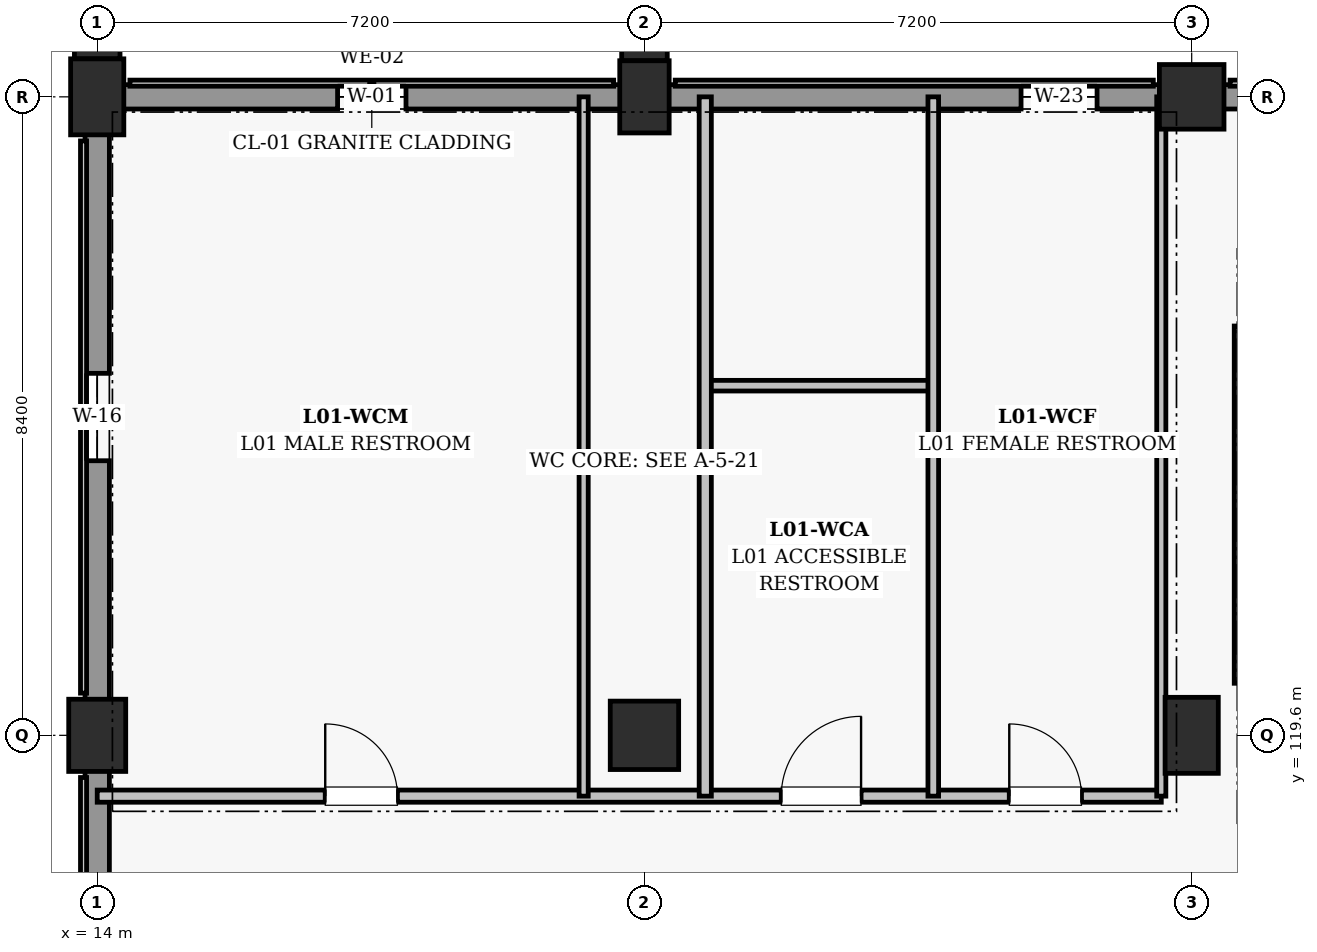
"""IFC4 building model, lengths in metres.
Left out: names, types, materials, properties, quantities, classifications, styles, units other than length and angle.
Written with IfcOpenShell. Run it as: python <this file> out.ifc"""

import sys

from ifc_helpers import new_model, si_unit, direction, frame, frame_2d, origin, origin_2d, place, context, subcontext, project, spatial, rectangle, extrude, element, fill, save


model = new_model("IFC4")
c1 = context("Model", 3, precision=1e-05, world=origin(), true_north=direction((0.0, 1.0)))
c2 = subcontext(c1, "Body", "Model", "MODEL_VIEW")
j1 = project(units=[si_unit("LENGTHUNIT", "METRE"), si_unit("PLANEANGLEUNIT", "RADIAN")], contexts=[c1])
p1 = place(None, origin())
s1 = spatial("IfcSite", under=j1, at=p1, CompositionType="ELEMENT")
p2 = place(p1, origin())
s2 = spatial("IfcBuilding", under=s1, at=p2, CompositionType="ELEMENT")
p3 = place(p2, frame((0.0, 0.0, 5.4)))
s3 = spatial("IfcBuildingStorey", under=s2, at=p3, CompositionType="ELEMENT", Elevation=5.4)
p4 = place(p3, frame((14.0, 119.6, 0.0), z_axis=(0.0, 0.0, 1.0), x_axis=(1.0, 0.0, 0.0)))
e1 = element("IfcColumn", 1, at=p4, inside=s3, PredefinedType="COLUMN", context=c2, shape_type="SweptSolid", body=[
    extrude(rectangle(XDim=0.75, YDim=0.95, at=origin_2d()), origin(), (0.0, 0.0, 1.0), 4.5),
])
p5 = place(p3, frame((14.0, 128.0, 0.0), z_axis=(0.0, 0.0, 1.0), x_axis=(1.0, 0.0, 0.0)))
e2 = element("IfcColumn", 2, at=p5, inside=s3, PredefinedType="COLUMN", context=c2, shape_type="SweptSolid", body=[
    extrude(rectangle(XDim=0.7, YDim=1.0, at=origin_2d()), origin(), (0.0, 0.0, 1.0), 4.5),
])
p6 = place(p3, frame((21.2, 119.6, 0.0), z_axis=(0.0, 0.0, 1.0), x_axis=(1.0, 0.0, 0.0)))
e3 = element("IfcColumn", 3, at=p6, inside=s3, PredefinedType="COLUMN", context=c2, shape_type="SweptSolid", body=[
    extrude(rectangle(XDim=0.9, YDim=0.9, at=origin_2d()), origin(), (0.0, 0.0, 1.0), 4.5),
])
p7 = place(p3, frame((21.2, 128.0, 0.0), z_axis=(0.0, 0.0, 1.0), x_axis=(1.0, 0.0, 0.0)))
e4 = element("IfcColumn", 4, at=p7, inside=s3, PredefinedType="COLUMN", context=c2, shape_type="SweptSolid", body=[
    extrude(rectangle(XDim=0.65, YDim=0.95, at=origin_2d()), origin(), (0.0, 0.0, 1.0), 4.5),
])
p8 = place(p3, frame((28.4, 119.6, 0.0), z_axis=(0.0, 0.0, 1.0), x_axis=(1.0, 0.0, 0.0)))
e5 = element("IfcColumn", 5, at=p8, inside=s3, PredefinedType="COLUMN", context=c2, shape_type="SweptSolid", body=[
    extrude(rectangle(XDim=0.7, YDim=1.0, at=origin_2d()), origin(), (0.0, 0.0, 1.0), 4.5),
])
p9 = place(p3, frame((28.4, 128.0, 0.0), z_axis=(0.0, 0.0, 1.0), x_axis=(1.0, 0.0, 0.0)))
e6 = element("IfcColumn", 6, at=p9, inside=s3, PredefinedType="COLUMN", context=c2, shape_type="SweptSolid", body=[
    extrude(rectangle(XDim=0.85, YDim=0.85, at=origin_2d()), origin(), (0.0, 0.0, 1.0), 4.5),
])
for number, where, z_axis, x_axis in (
    (7, (14.0, 128.928, 0.0), (0.0, 0.0, 1.0), (1.0, 0.0, 0.0)),
    (8, (21.2, 128.903, 0.0), (0.0, 0.0, 1.0), (1.0, 0.0, 0.0)),
):
    element("IfcColumn", number, at=place(p3, frame(where, z_axis=z_axis, x_axis=x_axis)), inside=s3, PredefinedType="PILASTER", context=c2, shape_type="SweptSolid", body=[
        extrude(rectangle(XDim=0.6, YDim=0.85, at=origin_2d()), origin(), (0.0, 0.0, 1.0), 4.5),
    ])
p10 = place(p3, frame((14.33, 128.0, 0.0), z_axis=(0.0, 0.0, 1.0), x_axis=(1.0, 0.0, 0.0)))
e9 = element("IfcWall", 9, at=p10, inside=s3, PredefinedType="SOLIDWALL", context=c2, shape_type="SweptSolid", body=[
    extrude(rectangle(XDim=6.565, YDim=0.32, at=frame_2d((3.282, 0.0))), origin(), (0.0, 0.0, 1.0), 3.505),
])
p11 = place(p10, frame((2.833, 0.0, 0.95)))
e10 = element("IfcOpeningElement", 10, at=p11, cuts=e9, PredefinedType="OPENING", context=c2, shape_type="SweptSolid", body=[
    extrude(rectangle(XDim=0.9, YDim=2.2, at=frame_2d((0.45, 1.1))), frame((0.0, 0.17, 0.0), z_axis=(0.0, -1.0, 0.0), x_axis=(1.0, 0.0, 0.0)), (0.0, 0.0, 1.0), 0.34),
])
p12 = place(p3, frame((21.505, 128.0, 0.0), z_axis=(0.0, 0.0, 1.0), x_axis=(1.0, 0.0, 0.0)))
e11 = element("IfcWall", 11, at=p12, inside=s3, PredefinedType="SOLIDWALL", context=c2, shape_type="SweptSolid", body=[
    extrude(rectangle(XDim=6.49, YDim=0.32, at=frame_2d((3.245, 0.0))), origin(), (0.0, 0.0, 1.0), 3.455),
])
p13 = place(p12, frame((4.65, 0.0, 1.85)))
e12 = element("IfcOpeningElement", 12, at=p13, cuts=e11, PredefinedType="OPENING", context=c2, shape_type="SweptSolid", body=[
    extrude(rectangle(XDim=1.0, YDim=0.95, at=frame_2d((0.5, 0.475))), frame((0.0, 0.17, 0.0), z_axis=(0.0, -1.0, 0.0), x_axis=(1.0, 0.0, 0.0)), (0.0, 0.0, 1.0), 0.34),
])
p14 = place(p3, frame((28.805, 128.0, 0.0), z_axis=(0.0, 0.0, 1.0), x_axis=(1.0, 0.0, 0.0)))
e13 = element("IfcWall", 13, at=p14, inside=s3, PredefinedType="SOLIDWALL", context=c2, shape_type="SweptSolid", body=[
    extrude(rectangle(XDim=6.44, YDim=0.32, at=frame_2d((3.22, 0.0))), origin(), (0.0, 0.0, 1.0), 3.555),
])
p15 = place(p3, frame((14.0, 111.63, 0.0), z_axis=(0.0, 0.0, 1.0), x_axis=(0.0, 1.0, 0.0)))
e14 = element("IfcWall", 14, at=p15, inside=s3, PredefinedType="SOLIDWALL", context=c2, shape_type="SweptSolid", body=[
    extrude(rectangle(XDim=7.515, YDim=0.32, at=frame_2d((3.758, 0.0))), origin(), (0.0, 0.0, 1.0), 3.555),
])
p16 = place(p15, frame((1.1, 0.0, 0.95)))
e15 = element("IfcOpeningElement", 15, at=p16, cuts=e14, PredefinedType="OPENING", context=c2, shape_type="SweptSolid", body=[
    extrude(rectangle(XDim=1.1, YDim=2.3, at=frame_2d((0.55, 1.15))), frame((0.0, 0.17, 0.0), z_axis=(0.0, -1.0, 0.0), x_axis=(1.0, 0.0, 0.0)), (0.0, 0.0, 1.0), 0.34),
])
p17 = place(p3, frame((14.0, 120.055, 0.0), z_axis=(0.0, 0.0, 1.0), x_axis=(0.0, 1.0, 0.0)))
e16 = element("IfcWall", 16, at=p17, inside=s3, PredefinedType="SOLIDWALL", context=c2, shape_type="SweptSolid", body=[
    extrude(rectangle(XDim=7.465, YDim=0.32, at=frame_2d((3.732, 0.0))), origin(), (0.0, 0.0, 1.0), 3.555),
])
p18 = place(p17, frame((3.157, 0.0, 0.95)))
e17 = element("IfcOpeningElement", 17, at=p18, cuts=e16, PredefinedType="OPENING", context=c2, shape_type="SweptSolid", body=[
    extrude(rectangle(XDim=1.15, YDim=2.25, at=frame_2d((0.575, 1.125))), frame((0.0, 0.17, 0.0), z_axis=(0.0, -1.0, 0.0), x_axis=(1.0, 0.0, 0.0)), (0.0, 0.0, 1.0), 0.34),
])
p19 = place(p3, frame((29.085, 124.985, 0.0), z_axis=(0.0, 0.0, 1.0), x_axis=(0.0, -1.0, 0.0)))
e18 = element("IfcWall", 18, at=p19, inside=s3, PredefinedType="SHEAR", context=c2, shape_type="SweptSolid", body=[
    extrude(rectangle(XDim=4.7, YDim=0.25, at=frame_2d((2.35, 0.0))), origin(), (0.0, 0.0, 1.0), 4.175),
])
p20 = place(p3, frame((14.0, 118.8, 0.0), z_axis=(0.0, 0.0, 1.0), x_axis=(1.0, 0.0, 0.0)))
e19 = element("IfcWall", 19, at=p20, inside=s3, PredefinedType="PARTITIONING", context=c2, shape_type="SweptSolid", body=[
    extrude(rectangle(XDim=14.0, YDim=0.16, at=frame_2d((7.0, 0.0))), origin(), (0.0, 0.0, 1.0), 3.36),
])
p21 = place(p20, frame((3.0, 0.0, 0.0)))
e20 = element("IfcOpeningElement", 20, at=p21, cuts=e19, PredefinedType="OPENING", context=c2, shape_type="SweptSolid", body=[
    extrude(rectangle(XDim=0.95, YDim=2.15, at=frame_2d((0.475, 1.075))), frame((0.0, 0.09, 0.0), z_axis=(0.0, -1.0, 0.0), x_axis=(1.0, 0.0, 0.0)), (0.0, 0.0, 1.0), 0.18),
])
p22 = place(p20, frame((9.0, 0.0, 0.0)))
e21 = element("IfcOpeningElement", 21, at=p22, cuts=e19, PredefinedType="OPENING", context=c2, shape_type="SweptSolid", body=[
    extrude(rectangle(XDim=1.05, YDim=2.15, at=frame_2d((0.525, 1.075))), frame((0.0, 0.09, 0.0), z_axis=(0.0, -1.0, 0.0), x_axis=(1.0, 0.0, 0.0)), (0.0, 0.0, 1.0), 0.18),
])
p23 = place(p20, frame((12.0, 0.0, 0.0)))
e22 = element("IfcOpeningElement", 22, at=p23, cuts=e19, PredefinedType="OPENING", context=c2, shape_type="SweptSolid", body=[
    extrude(rectangle(XDim=0.95, YDim=2.15, at=frame_2d((0.475, 1.075))), frame((0.0, 0.09, 0.0), z_axis=(0.0, -1.0, 0.0), x_axis=(1.0, 0.0, 0.0)), (0.0, 0.0, 1.0), 0.18),
])
p24 = place(p3, frame((22.0, 124.2, 0.0), z_axis=(0.0, 0.0, 1.0), x_axis=(1.0, 0.0, 0.0)))
e23 = element("IfcWall", 23, at=p24, inside=s3, PredefinedType="PARTITIONING", context=c2, shape_type="SweptSolid", body=[
    extrude(rectangle(XDim=3.0, YDim=0.14, at=frame_2d((1.5, 0.0))), origin(), (0.0, 0.0, 1.0), 3.56),
])
p25 = place(p3, frame((20.4, 118.8, 0.0), z_axis=(0.0, 0.0, 1.0), x_axis=(0.0, 1.0, 0.0)))
e24 = element("IfcWall", 24, at=p25, inside=s3, PredefinedType="PARTITIONING", context=c2, shape_type="SweptSolid", body=[
    extrude(rectangle(XDim=9.2, YDim=0.12, at=frame_2d((4.6, 0.0))), origin(), (0.0, 0.0, 1.0), 3.41),
])
p26 = place(p3, frame((22.0, 118.8, 0.0), z_axis=(0.0, 0.0, 1.0), x_axis=(0.0, 1.0, 0.0)))
e25 = element("IfcWall", 25, at=p26, inside=s3, PredefinedType="PARTITIONING", context=c2, shape_type="SweptSolid", body=[
    extrude(rectangle(XDim=9.2, YDim=0.16, at=frame_2d((4.6, 0.0))), origin(), (0.0, 0.0, 1.0), 3.36),
])
p27 = place(p3, frame((25.0, 118.8, 0.0), z_axis=(0.0, 0.0, 1.0), x_axis=(0.0, 1.0, 0.0)))
e26 = element("IfcWall", 26, at=p27, inside=s3, PredefinedType="PARTITIONING", context=c2, shape_type="SweptSolid", body=[
    extrude(rectangle(XDim=9.2, YDim=0.14, at=frame_2d((4.6, 0.0))), origin(), (0.0, 0.0, 1.0), 3.36),
])
p28 = place(p3, frame((28.0, 118.8, 0.0), z_axis=(0.0, 0.0, 1.0), x_axis=(0.0, 1.0, 0.0)))
e27 = element("IfcWall", 27, at=p28, inside=s3, PredefinedType="PARTITIONING", context=c2, shape_type="SweptSolid", body=[
    extrude(rectangle(XDim=9.2, YDim=0.12, at=frame_2d((4.6, 0.0))), origin(), (0.0, 0.0, 1.0), 3.36),
])
p29 = place(p11, origin())
e28 = element("IfcWindow", 28, at=p29, inside=s3, PartitioningType="SINGLE_PANEL", PredefinedType="WINDOW", context=c2, shape_type="SweptSolid", body=[
    extrude(rectangle(XDim=0.9, YDim=2.2, at=frame_2d((0.45, 1.1))), frame((0.0, 0.03, 0.0), z_axis=(0.0, -1.0, 0.0), x_axis=(1.0, 0.0, 0.0)), (0.0, 0.0, 1.0), 0.06),
])
fill(e10, e28)
p30 = place(p13, origin())
e29 = element("IfcWindow", 29, at=p30, inside=s3, PartitioningType="SINGLE_PANEL", PredefinedType="WINDOW", context=c2, shape_type="SweptSolid", body=[
    extrude(rectangle(XDim=1.0, YDim=0.95, at=frame_2d((0.5, 0.475))), frame((0.0, 0.03, 0.0), z_axis=(0.0, -1.0, 0.0), x_axis=(1.0, 0.0, 0.0)), (0.0, 0.0, 1.0), 0.06),
])
fill(e12, e29)
p31 = place(p18, origin())
e30 = element("IfcWindow", 30, at=p31, inside=s3, PartitioningType="SINGLE_PANEL", PredefinedType="WINDOW", context=c2, shape_type="SweptSolid", body=[
    extrude(rectangle(XDim=1.15, YDim=2.25, at=frame_2d((0.575, 1.125))), frame((0.0, 0.03, 0.0), z_axis=(0.0, -1.0, 0.0), x_axis=(1.0, 0.0, 0.0)), (0.0, 0.0, 1.0), 0.06),
])
fill(e17, e30)
p32 = place(p21, origin())
e31 = element("IfcDoor", 31, at=p32, inside=s3, OperationType="SINGLE_SWING_LEFT", PredefinedType="DOOR", context=c2, shape_type="SweptSolid", body=[
    extrude(rectangle(XDim=0.95, YDim=2.15, at=frame_2d((0.475, 1.075))), frame((0.0, 0.025, 0.0), z_axis=(0.0, -1.0, 0.0), x_axis=(1.0, 0.0, 0.0)), (0.0, 0.0, 1.0), 0.05),
])
fill(e20, e31)
p33 = place(p22, origin())
e32 = element("IfcDoor", 32, at=p33, inside=s3, OperationType="SINGLE_SWING_RIGHT", PredefinedType="DOOR", context=c2, shape_type="SweptSolid", body=[
    extrude(rectangle(XDim=1.05, YDim=2.15, at=frame_2d((0.525, 1.075))), frame((0.0, 0.025, 0.0), z_axis=(0.0, -1.0, 0.0), x_axis=(1.0, 0.0, 0.0)), (0.0, 0.0, 1.0), 0.05),
])
fill(e21, e32)
p34 = place(p23, origin())
e33 = element("IfcDoor", 33, at=p34, inside=s3, OperationType="SINGLE_SWING_LEFT", PredefinedType="DOOR", context=c2, shape_type="SweptSolid", body=[
    extrude(rectangle(XDim=0.95, YDim=2.15, at=frame_2d((0.475, 1.075))), frame((0.0, 0.025, 0.0), z_axis=(0.0, -1.0, 0.0), x_axis=(1.0, 0.0, 0.0)), (0.0, 0.0, 1.0), 0.05),
])
fill(e22, e33)
save(model, sys.argv[1])
